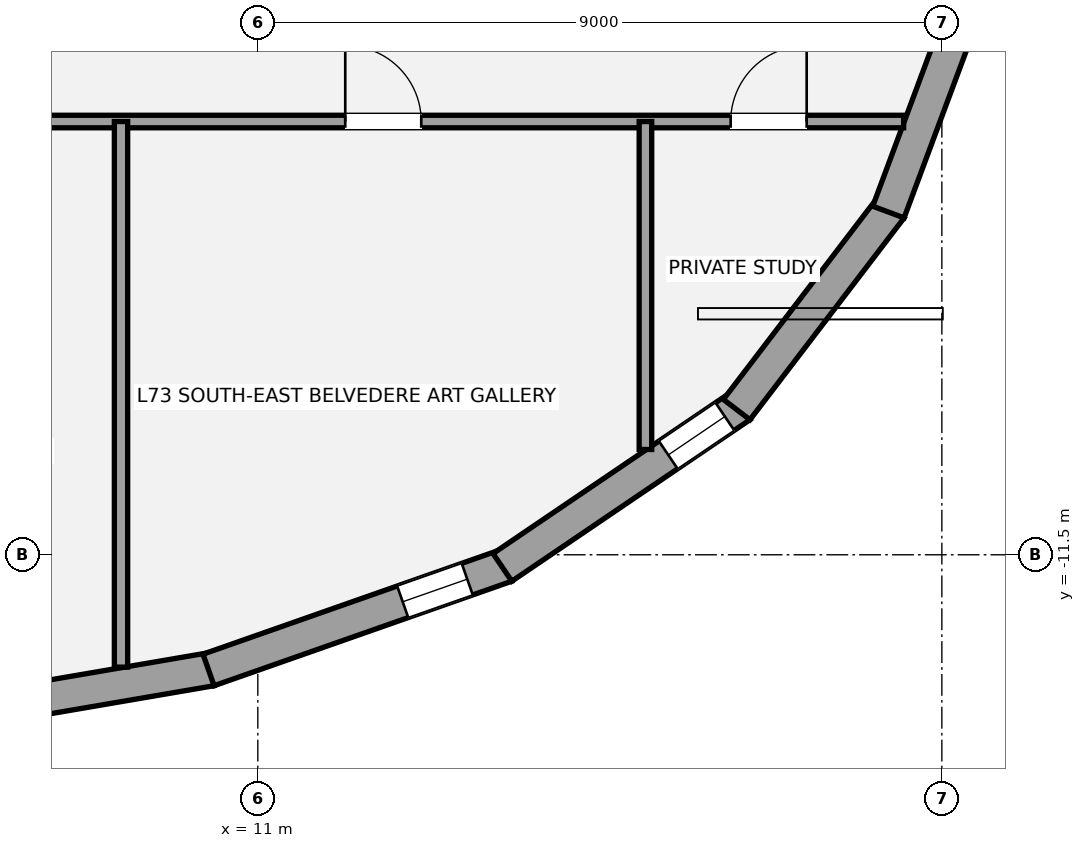
"""IFC4 building model, lengths in metres.
Left out: names, types, materials, properties, quantities, classifications, styles, units other than length and angle.
Written with IfcOpenShell. Run it as: python <this file> out.ifc"""

import sys

from ifc_helpers import new_model, si_unit, direction, frame, frame_2d, origin, place, context, subcontext, project, spatial, rectangle, extrude, element, fill, save


model = new_model("IFC4")
c1 = context("Model", 3, precision=1e-05, world=origin(), true_north=direction((0.0, 1.0)))
c2 = subcontext(c1, "Body", "Model", "MODEL_VIEW")
j1 = project(units=[si_unit("LENGTHUNIT", "METRE"), si_unit("PLANEANGLEUNIT", "RADIAN")], contexts=[c1])
p1 = place(None, origin())
s1 = spatial("IfcSite", under=j1, at=p1, CompositionType="ELEMENT")
p2 = place(p1, origin())
s2 = spatial("IfcBuilding", under=s1, at=p2, CompositionType="ELEMENT")
p3 = place(p2, frame((0.0, 0.0, 257.25)))
s3 = spatial("IfcBuildingStorey", under=s2, at=p3, CompositionType="ELEMENT", Elevation=257.25)
p4 = place(p3, frame((10.388, -13.006, 0.0), z_axis=(0.0, 0.0, 1.0), x_axis=(-0.985667057966, -0.168702254995, 0.0)))
e1 = element("IfcWall", 1, at=p4, inside=s3, PredefinedType="STANDARD", context=c2, shape_type="SweptSolid", body=[
    extrude(rectangle(XDim=4.249, YDim=0.44, at=frame_2d((2.125, 0.0))), origin(), (0.0, 0.0, 1.0), 2.296),
])
p5 = place(p4, frame((2.949, 0.0, 0.58)))
e2 = element("IfcOpeningElement", 2, at=p5, cuts=e1, PredefinedType="OPENING", context=c2, shape_type="SweptSolid", body=[
    extrude(rectangle(XDim=0.9, YDim=1.35, at=frame_2d((0.45, 0.675))), frame((0.0, 0.23, 0.0), z_axis=(0.0, -1.0, 0.0), x_axis=(1.0, 0.0, 0.0)), (0.0, 0.0, 1.0), 0.46),
])
p6 = place(p3, frame((14.269, -11.64, 0.0), z_axis=(0.0, 0.0, 1.0), x_axis=(-0.943571934891, -0.331167636834, 0.0)))
e3 = element("IfcWall", 3, at=p6, inside=s3, PredefinedType="STANDARD", context=c2, shape_type="SweptSolid", body=[
    extrude(rectangle(XDim=4.151, YDim=0.44, at=frame_2d((2.076, 0.0))), origin(), (0.0, 0.0, 1.0), 2.296),
])
p7 = place(p6, frame((0.544, 0.0, 0.58)))
e4 = element("IfcOpeningElement", 4, at=p7, cuts=e3, PredefinedType="OPENING", context=c2, shape_type="SweptSolid", body=[
    extrude(rectangle(XDim=0.9, YDim=1.35, at=frame_2d((0.45, 0.675))), frame((0.0, 0.23, 0.0), z_axis=(0.0, -1.0, 0.0), x_axis=(1.0, 0.0, 0.0)), (0.0, 0.0, 1.0), 0.46),
])
p8 = place(p3, frame((17.352, -9.541, 0.0), z_axis=(0.0, 0.0, 1.0), x_axis=(-0.827669406477, -0.561215959842, 0.0)))
e5 = element("IfcWall", 5, at=p8, inside=s3, PredefinedType="STANDARD", context=c2, shape_type="SweptSolid", body=[
    extrude(rectangle(XDim=3.786, YDim=0.44, at=frame_2d((1.893, 0.0))), origin(), (0.0, 0.0, 1.0), 2.296),
])
p9 = place(p8, frame((0.25, 0.0, 0.58)))
e6 = element("IfcOpeningElement", 6, at=p9, cuts=e5, PredefinedType="OPENING", context=c2, shape_type="SweptSolid", body=[
    extrude(rectangle(XDim=0.9, YDim=1.35, at=frame_2d((0.45, 0.675))), frame((0.0, 0.23, 0.0), z_axis=(0.0, -1.0, 0.0), x_axis=(1.0, 0.0, 0.0)), (0.0, 0.0, 1.0), 0.46),
])
p10 = place(p3, frame((19.328, -6.934, 0.0), z_axis=(0.0, 0.0, 1.0), x_axis=(-0.606828844818, -0.794832531479, 0.0)))
e7 = element("IfcWall", 7, at=p10, inside=s3, PredefinedType="STANDARD", context=c2, shape_type="SweptSolid", body=[
    extrude(rectangle(XDim=3.341, YDim=0.44, at=frame_2d((1.671, 0.0))), origin(), (0.0, 0.0, 1.0), 2.296),
])
p11 = place(p3, frame((20.354, -4.152, 0.0), z_axis=(0.0, 0.0, 1.0), x_axis=(-0.34898554078, -0.937128108813, 0.0)))
e8 = element("IfcWall", 8, at=p11, inside=s3, PredefinedType="STANDARD", context=c2, shape_type="SweptSolid", body=[
    extrude(rectangle(XDim=3.03, YDim=0.44, at=frame_2d((1.515, 0.0))), origin(), (0.0, 0.0, 1.0), 2.296),
])
p12 = place(p3, frame((-19.497, -5.8, 0.0), z_axis=(0.0, 0.0, 1.0), x_axis=(1.0, 0.0, 0.0)))
e9 = element("IfcWall", 9, at=p12, inside=s3, PredefinedType="PARTITIONING", context=c2, shape_type="SweptSolid", body=[
    extrude(rectangle(XDim=38.994, YDim=0.165, at=frame_2d((19.497, 0.0))), origin(), (0.0, 0.0, 1.0), 2.383),
])
p13 = place(p12, frame((1.035, 0.0, 0.0)))
e10 = element("IfcOpeningElement", 10, at=p13, cuts=e9, PredefinedType="OPENING", context=c2, shape_type="SweptSolid", body=[
    extrude(rectangle(XDim=1.0, YDim=2.15, at=frame_2d((0.5, 1.075))), frame((0.0, 0.093, 0.0), z_axis=(0.0, -1.0, 0.0), x_axis=(1.0, 0.0, 0.0)), (0.0, 0.0, 1.0), 0.185),
])
p14 = place(p12, frame((36.719, 0.0, 0.0)))
e11 = element("IfcOpeningElement", 11, at=p14, cuts=e9, PredefinedType="OPENING", context=c2, shape_type="SweptSolid", body=[
    extrude(rectangle(XDim=1.0, YDim=2.15, at=frame_2d((0.5, 1.075))), frame((0.0, 0.093, 0.0), z_axis=(0.0, -1.0, 0.0), x_axis=(1.0, 0.0, 0.0)), (0.0, 0.0, 1.0), 0.185),
])
p15 = place(p12, frame((6.548, 0.0, 0.0)))
e12 = element("IfcOpeningElement", 12, at=p15, cuts=e9, PredefinedType="OPENING", context=c2, shape_type="SweptSolid", body=[
    extrude(rectangle(XDim=1.0, YDim=2.15, at=frame_2d((0.5, 1.075))), frame((0.0, 0.093, 0.0), z_axis=(0.0, -1.0, 0.0), x_axis=(1.0, 0.0, 0.0)), (0.0, 0.0, 1.0), 0.185),
])
p16 = place(p12, frame((13.778, 0.0, 0.0)))
e13 = element("IfcOpeningElement", 13, at=p16, cuts=e9, PredefinedType="OPENING", context=c2, shape_type="SweptSolid", body=[
    extrude(rectangle(XDim=1.0, YDim=2.15, at=frame_2d((0.5, 1.075))), frame((0.0, 0.093, 0.0), z_axis=(0.0, -1.0, 0.0), x_axis=(1.0, 0.0, 0.0)), (0.0, 0.0, 1.0), 0.185),
])
p17 = place(p12, frame((19.397, 0.0, 0.0)))
e14 = element("IfcOpeningElement", 14, at=p17, cuts=e9, PredefinedType="OPENING", context=c2, shape_type="SweptSolid", body=[
    extrude(rectangle(XDim=1.0, YDim=2.15, at=frame_2d((0.5, 1.075))), frame((0.0, 0.093, 0.0), z_axis=(0.0, -1.0, 0.0), x_axis=(1.0, 0.0, 0.0)), (0.0, 0.0, 1.0), 0.185),
])
p18 = place(p12, frame((26.018, 0.0, 0.0)))
e15 = element("IfcOpeningElement", 15, at=p18, cuts=e9, PredefinedType="OPENING", context=c2, shape_type="SweptSolid", body=[
    extrude(rectangle(XDim=1.0, YDim=2.15, at=frame_2d((0.5, 1.075))), frame((0.0, 0.093, 0.0), z_axis=(0.0, -1.0, 0.0), x_axis=(1.0, 0.0, 0.0)), (0.0, 0.0, 1.0), 0.185),
])
p19 = place(p12, frame((31.647, 0.0, 0.0)))
e16 = element("IfcOpeningElement", 16, at=p19, cuts=e9, PredefinedType="OPENING", context=c2, shape_type="SweptSolid", body=[
    extrude(rectangle(XDim=1.0, YDim=2.15, at=frame_2d((0.5, 1.075))), frame((0.0, 0.093, 0.0), z_axis=(0.0, -1.0, 0.0), x_axis=(1.0, 0.0, 0.0)), (0.0, 0.0, 1.0), 0.185),
])
p20 = place(p3, frame((16.1, -10.115, 0.0), z_axis=(0.0, 0.0, 1.0), x_axis=(0.0, 1.0, 0.0)))
e17 = element("IfcWall", 17, at=p20, inside=s3, PredefinedType="PARTITIONING", context=c2, shape_type="SweptSolid", body=[
    extrude(rectangle(XDim=4.314, YDim=0.165, at=frame_2d((2.157, 0.0))), origin(), (0.0, 0.0, 1.0), 2.383),
])
p21 = place(p3, frame((9.2, -12.978, 0.0), z_axis=(0.0, 0.0, 1.0), x_axis=(0.0, 1.0, 0.0)))
e18 = element("IfcWall", 18, at=p21, inside=s3, PredefinedType="PARTITIONING", context=c2, shape_type="SweptSolid", body=[
    extrude(rectangle(XDim=7.178, YDim=0.175, at=frame_2d((3.589, 0.0))), origin(), (0.0, 0.0, 1.0), 2.93),
])
p22 = place(p7, origin())
e19 = element("IfcWindow", 19, at=p22, inside=s3, PartitioningType="SINGLE_PANEL", PredefinedType="WINDOW", context=c2, shape_type="SweptSolid", body=[
    extrude(rectangle(XDim=0.9, YDim=1.35, at=frame_2d((0.45, 0.675))), frame((0.0, -0.01, 0.0), z_axis=(0.0, -1.0, 0.0), x_axis=(1.0, 0.0, 0.0)), (0.0, 0.0, 1.0), 0.06),
])
fill(e4, e19)
p23 = place(p9, origin())
e20 = element("IfcWindow", 20, at=p23, inside=s3, PartitioningType="SINGLE_PANEL", PredefinedType="WINDOW", context=c2, shape_type="SweptSolid", body=[
    extrude(rectangle(XDim=0.9, YDim=1.35, at=frame_2d((0.45, 0.675))), frame((0.0, -0.01, 0.0), z_axis=(0.0, -1.0, 0.0), x_axis=(1.0, 0.0, 0.0)), (0.0, 0.0, 1.0), 0.06),
])
fill(e6, e20)
p24 = place(p14, origin())
e21 = element("IfcDoor", 21, at=p24, inside=s3, OperationType="SINGLE_SWING_RIGHT", PredefinedType="DOOR", context=c2, shape_type="SweptSolid", body=[
    extrude(rectangle(XDim=1.0, YDim=2.15, at=frame_2d((0.5, 1.075))), frame((0.0, 0.025, 0.0), z_axis=(0.0, -1.0, 0.0), x_axis=(1.0, 0.0, 0.0)), (0.0, 0.0, 1.0), 0.05),
])
fill(e11, e21)
p25 = place(p19, origin())
e22 = element("IfcDoor", 22, at=p25, inside=s3, OperationType="SINGLE_SWING_LEFT", PredefinedType="DOOR", context=c2, shape_type="SweptSolid", body=[
    extrude(rectangle(XDim=1.0, YDim=2.15, at=frame_2d((0.5, 1.075))), frame((0.0, 0.025, 0.0), z_axis=(0.0, -1.0, 0.0), x_axis=(1.0, 0.0, 0.0)), (0.0, 0.0, 1.0), 0.05),
])
fill(e16, e22)
save(model, sys.argv[1])
